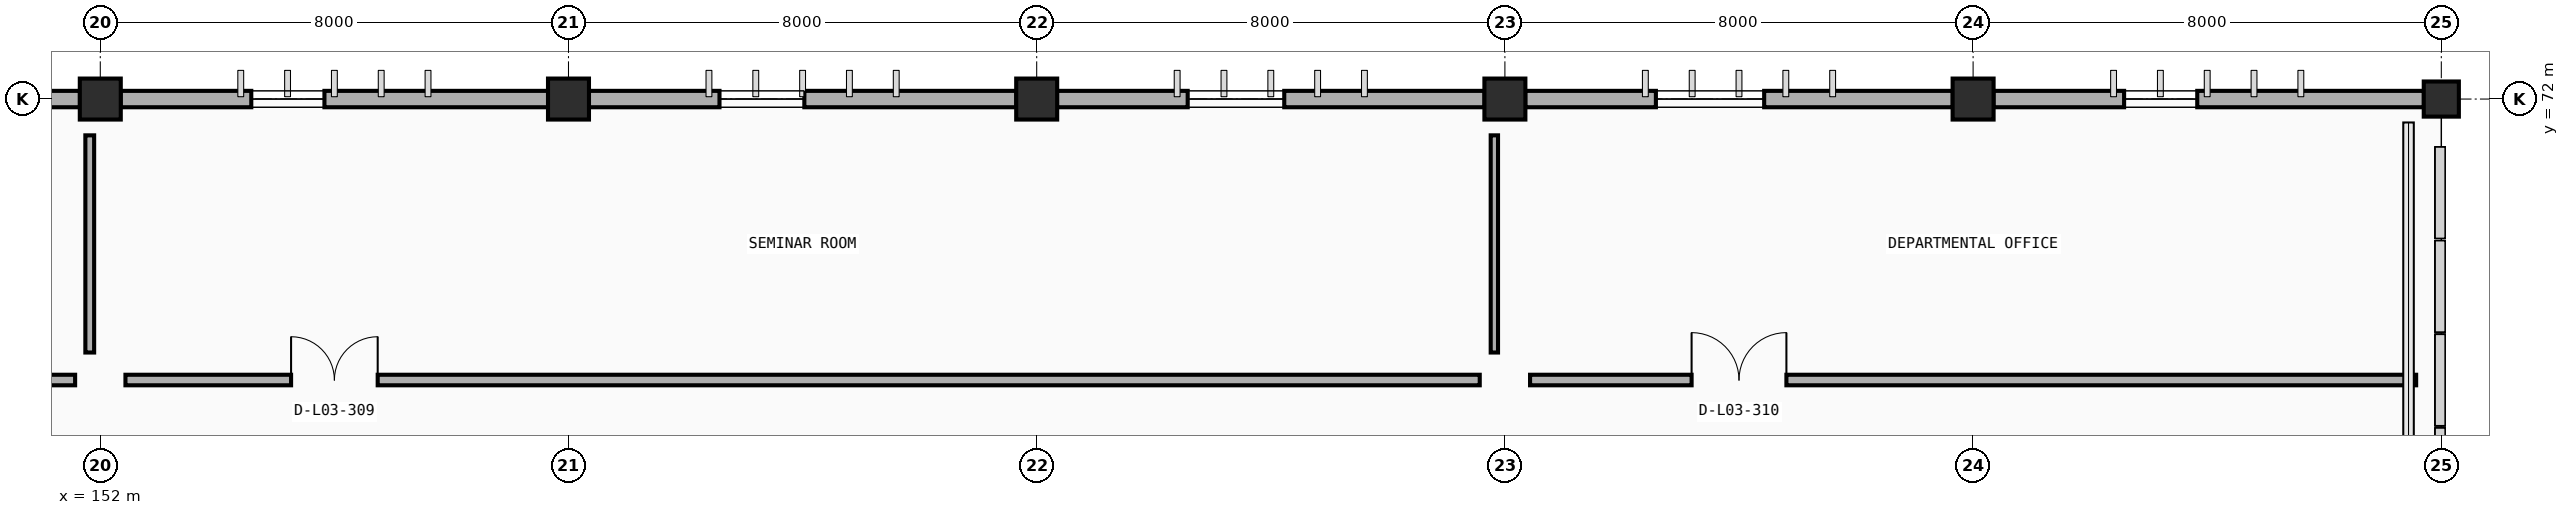
"""IFC4 building model, lengths in metres.
Left out: names, types, materials, properties, quantities, classifications, styles, units other than length and angle.
Written with IfcOpenShell. Run it as: python <this file> out.ifc"""

import sys

from ifc_helpers import new_model, si_unit, direction, frame, frame_2d, origin, origin_2d, place, context, subcontext, project, spatial, rectangle, extrude, element, fill, save


model = new_model("IFC4")
c1 = context("Model", 3, precision=1e-05, world=origin(), true_north=direction((0.0, 1.0)))
c2 = subcontext(c1, "Body", "Model", "MODEL_VIEW")
j1 = project(units=[si_unit("LENGTHUNIT", "METRE"), si_unit("PLANEANGLEUNIT", "RADIAN")], contexts=[c1])
p1 = place(None, origin())
s1 = spatial("IfcSite", under=j1, at=p1, CompositionType="ELEMENT")
p2 = place(p1, origin())
s2 = spatial("IfcBuilding", under=s1, at=p2, CompositionType="ELEMENT")
p3 = place(p2, frame((0.0, 0.0, 9.6)))
s3 = spatial("IfcBuildingStorey", under=s2, at=p3, CompositionType="ELEMENT", Elevation=9.6)
for number, where, z_axis, x_axis in (
    (1, (152.0, 72.0, 0.0), (0.0, 0.0, 1.0), (1.0, 0.0, 0.0)),
    (2, (160.0, 72.0, 0.0), (0.0, 0.0, 1.0), (1.0, 0.0, 0.0)),
    (3, (168.0, 72.0, 0.0), (0.0, 0.0, 1.0), (1.0, 0.0, 0.0)),
    (4, (176.0, 72.0, 0.0), (0.0, 0.0, 1.0), (1.0, 0.0, 0.0)),
    (5, (184.0, 72.0, 0.0), (0.0, 0.0, 1.0), (1.0, 0.0, 0.0)),
):
    element("IfcColumn", number, at=place(p3, frame(where, z_axis=z_axis, x_axis=x_axis)), inside=s3, PredefinedType="COLUMN", context=c2, shape_type="SweptSolid", body=[
        extrude(rectangle(XDim=0.7, YDim=0.7, at=origin_2d()), origin(), (0.0, 0.0, 1.0), 4.2),
    ])
p4 = place(p3, frame((192.0, 72.0, 0.0), z_axis=(0.0, 0.0, 1.0), x_axis=(1.0, 0.0, 0.0)))
e6 = element("IfcColumn", 6, at=p4, inside=s3, PredefinedType="COLUMN", context=c2, shape_type="SweptSolid", body=[
    extrude(rectangle(XDim=0.6, YDim=0.6, at=origin_2d()), origin(), (0.0, 0.0, 1.0), 4.2),
])
p5 = place(p3, frame((144.347, 72.0, 0.0), z_axis=(0.0, 0.0, 1.0), x_axis=(1.0, 0.0, 0.0)))
e7 = element("IfcWall", 7, at=p5, inside=s3, PredefinedType="STANDARD", context=c2, shape_type="SweptSolid", body=[
    extrude(rectangle(XDim=7.306, YDim=0.28, at=frame_2d((3.653, 0.0))), origin(), (0.0, 0.0, 1.0), 3.325),
])
p6 = place(p5, frame((2.233, 0.0, 0.9)))
e8 = element("IfcOpeningElement", 8, at=p6, cuts=e7, PredefinedType="OPENING", context=c2, shape_type="SweptSolid", body=[
    extrude(rectangle(XDim=1.85, YDim=2.0, at=frame_2d((0.925, 1.0))), frame((0.0, 0.15, 0.0), z_axis=(0.0, -1.0, 0.0), x_axis=(1.0, 0.0, 0.0)), (0.0, 0.0, 1.0), 0.3),
])
p7 = place(p3, frame((152.347, 72.0, 0.0), z_axis=(0.0, 0.0, 1.0), x_axis=(1.0, 0.0, 0.0)))
e9 = element("IfcWall", 9, at=p7, inside=s3, PredefinedType="STANDARD", context=c2, shape_type="SweptSolid", body=[
    extrude(rectangle(XDim=7.306, YDim=0.28, at=frame_2d((3.653, 0.0))), origin(), (0.0, 0.0, 1.0), 3.325),
])
p8 = place(p7, frame((2.233, 0.0, 0.9)))
e10 = element("IfcOpeningElement", 10, at=p8, cuts=e9, PredefinedType="OPENING", context=c2, shape_type="SweptSolid", body=[
    extrude(rectangle(XDim=1.25, YDim=2.0, at=frame_2d((0.625, 1.0))), frame((0.0, 0.15, 0.0), z_axis=(0.0, -1.0, 0.0), x_axis=(1.0, 0.0, 0.0)), (0.0, 0.0, 1.0), 0.3),
])
p9 = place(p3, frame((160.347, 72.0, 0.0), z_axis=(0.0, 0.0, 1.0), x_axis=(1.0, 0.0, 0.0)))
e11 = element("IfcWall", 11, at=p9, inside=s3, PredefinedType="STANDARD", context=c2, shape_type="SweptSolid", body=[
    extrude(rectangle(XDim=7.306, YDim=0.28, at=frame_2d((3.653, 0.0))), origin(), (0.0, 0.0, 1.0), 3.325),
])
p10 = place(p9, frame((2.233, 0.0, 0.9)))
e12 = element("IfcOpeningElement", 12, at=p10, cuts=e11, PredefinedType="OPENING", context=c2, shape_type="SweptSolid", body=[
    extrude(rectangle(XDim=1.45, YDim=2.0, at=frame_2d((0.725, 1.0))), frame((0.0, 0.15, 0.0), z_axis=(0.0, -1.0, 0.0), x_axis=(1.0, 0.0, 0.0)), (0.0, 0.0, 1.0), 0.3),
])
p11 = place(p3, frame((168.347, 72.0, 0.0), z_axis=(0.0, 0.0, 1.0), x_axis=(1.0, 0.0, 0.0)))
e13 = element("IfcWall", 13, at=p11, inside=s3, PredefinedType="STANDARD", context=c2, shape_type="SweptSolid", body=[
    extrude(rectangle(XDim=7.306, YDim=0.28, at=frame_2d((3.653, 0.0))), origin(), (0.0, 0.0, 1.0), 3.325),
])
p12 = place(p11, frame((2.233, 0.0, 0.9)))
e14 = element("IfcOpeningElement", 14, at=p12, cuts=e13, PredefinedType="OPENING", context=c2, shape_type="SweptSolid", body=[
    extrude(rectangle(XDim=1.65, YDim=2.0, at=frame_2d((0.825, 1.0))), frame((0.0, 0.15, 0.0), z_axis=(0.0, -1.0, 0.0), x_axis=(1.0, 0.0, 0.0)), (0.0, 0.0, 1.0), 0.3),
])
p13 = place(p3, frame((176.347, 72.0, 0.0), z_axis=(0.0, 0.0, 1.0), x_axis=(1.0, 0.0, 0.0)))
e15 = element("IfcWall", 15, at=p13, inside=s3, PredefinedType="STANDARD", context=c2, shape_type="SweptSolid", body=[
    extrude(rectangle(XDim=7.306, YDim=0.28, at=frame_2d((3.653, 0.0))), origin(), (0.0, 0.0, 1.0), 3.325),
])
p14 = place(p13, frame((2.233, 0.0, 0.9)))
e16 = element("IfcOpeningElement", 16, at=p14, cuts=e15, PredefinedType="OPENING", context=c2, shape_type="SweptSolid", body=[
    extrude(rectangle(XDim=1.85, YDim=2.0, at=frame_2d((0.925, 1.0))), frame((0.0, 0.15, 0.0), z_axis=(0.0, -1.0, 0.0), x_axis=(1.0, 0.0, 0.0)), (0.0, 0.0, 1.0), 0.3),
])
p15 = place(p3, frame((184.347, 72.0, 0.0), z_axis=(0.0, 0.0, 1.0), x_axis=(1.0, 0.0, 0.0)))
e17 = element("IfcWall", 17, at=p15, inside=s3, PredefinedType="STANDARD", context=c2, shape_type="SweptSolid", body=[
    extrude(rectangle(XDim=7.356, YDim=0.28, at=frame_2d((3.678, 0.0))), origin(), (0.0, 0.0, 1.0), 3.325),
])
p16 = place(p15, frame((2.233, 0.0, 0.9)))
e18 = element("IfcOpeningElement", 18, at=p16, cuts=e17, PredefinedType="OPENING", context=c2, shape_type="SweptSolid", body=[
    extrude(rectangle(XDim=1.25, YDim=2.0, at=frame_2d((0.625, 1.0))), frame((0.0, 0.15, 0.0), z_axis=(0.0, -1.0, 0.0), x_axis=(1.0, 0.0, 0.0)), (0.0, 0.0, 1.0), 0.3),
])
p17 = place(p3, frame((191.76, 71.78, 0.0), z_axis=(0.0, 0.0, 1.0), x_axis=(-1.0, 0.0, 0.0)))
e19 = element("IfcWall", 19, at=p17, inside=s3, PredefinedType="PARAPET", context=c2, shape_type="SweptSolid", body=[
    extrude(rectangle(XDim=0.32, YDim=0.2, at=frame_2d((0.16, 0.0))), origin(), (0.0, 0.0, 1.0), 3.35),
])
p18 = place(p3, frame((128.43, 67.2, 0.0), z_axis=(0.0, 0.0, 1.0), x_axis=(1.0, 0.0, 0.0)))
e20 = element("IfcWall", 20, at=p18, inside=s3, PredefinedType="PARTITIONING", context=c2, shape_type="SweptSolid", body=[
    extrude(rectangle(XDim=23.14, YDim=0.18, at=frame_2d((11.57, 0.0))), origin(), (0.0, 0.0, 1.0), 3.3),
])
p19 = place(p18, frame((2.995, 0.0, 0.0)))
e21 = element("IfcOpeningElement", 21, at=p19, cuts=e20, PredefinedType="OPENING", context=c2, shape_type="SweptSolid", body=[
    extrude(rectangle(XDim=1.15, YDim=2.15, at=frame_2d((0.575, 1.075))), frame((0.0, 0.1, 0.0), z_axis=(0.0, -1.0, 0.0), x_axis=(1.0, 0.0, 0.0)), (0.0, 0.0, 1.0), 0.2),
])
p20 = place(p3, frame((151.82, 67.67, 0.0), z_axis=(0.0, 0.0, 1.0), x_axis=(0.0, 1.0, 0.0)))
e22 = element("IfcWall", 22, at=p20, inside=s3, PredefinedType="PARTITIONING", context=c2, shape_type="SweptSolid", body=[
    extrude(rectangle(XDim=3.71, YDim=0.15, at=frame_2d((1.855, 0.0))), origin(), (0.0, 0.0, 1.0), 3.225),
])
p21 = place(p3, frame((152.43, 67.2, 0.0), z_axis=(0.0, 0.0, 1.0), x_axis=(1.0, 0.0, 0.0)))
e23 = element("IfcWall", 23, at=p21, inside=s3, PredefinedType="PARTITIONING", context=c2, shape_type="SweptSolid", body=[
    extrude(rectangle(XDim=23.14, YDim=0.18, at=frame_2d((11.57, 0.0))), origin(), (0.0, 0.0, 1.0), 3.3),
])
p22 = place(p21, frame((2.83, 0.0, 0.0)))
e24 = element("IfcOpeningElement", 24, at=p22, cuts=e23, PredefinedType="OPENING", context=c2, shape_type="SweptSolid", body=[
    extrude(rectangle(XDim=1.48, YDim=2.2, at=frame_2d((0.74, 1.1))), frame((0.0, 0.1, 0.0), z_axis=(0.0, -1.0, 0.0), x_axis=(1.0, 0.0, 0.0)), (0.0, 0.0, 1.0), 0.2),
])
p23 = place(p3, frame((175.82, 67.67, 0.0), z_axis=(0.0, 0.0, 1.0), x_axis=(0.0, 1.0, 0.0)))
e25 = element("IfcWall", 25, at=p23, inside=s3, PredefinedType="PARTITIONING", context=c2, shape_type="SweptSolid", body=[
    extrude(rectangle(XDim=3.71, YDim=0.125, at=frame_2d((1.855, 0.0))), origin(), (0.0, 0.0, 1.0), 3.225),
])
p24 = place(p3, frame((176.43, 67.2, 0.0), z_axis=(0.0, 0.0, 1.0), x_axis=(1.0, 0.0, 0.0)))
e26 = element("IfcWall", 26, at=p24, inside=s3, PredefinedType="PARTITIONING", context=c2, shape_type="SweptSolid", body=[
    extrude(rectangle(XDim=15.14, YDim=0.18, at=frame_2d((7.57, 0.0))), origin(), (0.0, 0.0, 1.0), 3.3),
])
p25 = place(p24, frame((2.76, 0.0, 0.0)))
e27 = element("IfcOpeningElement", 27, at=p25, cuts=e26, PredefinedType="OPENING", context=c2, shape_type="SweptSolid", body=[
    extrude(rectangle(XDim=1.62, YDim=2.2, at=frame_2d((0.81, 1.1))), frame((0.0, 0.1, 0.0), z_axis=(0.0, -1.0, 0.0), x_axis=(1.0, 0.0, 0.0)), (0.0, 0.0, 1.0), 0.2),
])
p26 = place(p8, origin())
e28 = element("IfcWindow", 28, at=p26, inside=s3, PartitioningType="SINGLE_PANEL", PredefinedType="WINDOW", context=c2, shape_type="SweptSolid", body=[
    extrude(rectangle(XDim=1.25, YDim=2.0, at=frame_2d((0.625, 1.0))), frame((0.0, 0.03, 0.0), z_axis=(0.0, -1.0, 0.0), x_axis=(1.0, 0.0, 0.0)), (0.0, 0.0, 1.0), 0.06),
])
fill(e10, e28)
p27 = place(p10, origin())
e29 = element("IfcWindow", 29, at=p27, inside=s3, PartitioningType="SINGLE_PANEL", PredefinedType="WINDOW", context=c2, shape_type="SweptSolid", body=[
    extrude(rectangle(XDim=1.45, YDim=2.0, at=frame_2d((0.725, 1.0))), frame((0.0, 0.03, 0.0), z_axis=(0.0, -1.0, 0.0), x_axis=(1.0, 0.0, 0.0)), (0.0, 0.0, 1.0), 0.06),
])
fill(e12, e29)
p28 = place(p12, origin())
e30 = element("IfcWindow", 30, at=p28, inside=s3, PartitioningType="DOUBLE_PANEL_VERTICAL", PredefinedType="WINDOW", context=c2, shape_type="SweptSolid", body=[
    extrude(rectangle(XDim=1.65, YDim=2.0, at=frame_2d((0.825, 1.0))), frame((0.0, 0.03, 0.0), z_axis=(0.0, -1.0, 0.0), x_axis=(1.0, 0.0, 0.0)), (0.0, 0.0, 1.0), 0.06),
])
fill(e14, e30)
p29 = place(p14, origin())
e31 = element("IfcWindow", 31, at=p29, inside=s3, PartitioningType="DOUBLE_PANEL_VERTICAL", PredefinedType="WINDOW", context=c2, shape_type="SweptSolid", body=[
    extrude(rectangle(XDim=1.85, YDim=2.0, at=frame_2d((0.925, 1.0))), frame((0.0, 0.03, 0.0), z_axis=(0.0, -1.0, 0.0), x_axis=(1.0, 0.0, 0.0)), (0.0, 0.0, 1.0), 0.06),
])
fill(e16, e31)
p30 = place(p16, origin())
e32 = element("IfcWindow", 32, at=p30, inside=s3, PartitioningType="SINGLE_PANEL", PredefinedType="WINDOW", context=c2, shape_type="SweptSolid", body=[
    extrude(rectangle(XDim=1.25, YDim=2.0, at=frame_2d((0.625, 1.0))), frame((0.0, 0.03, 0.0), z_axis=(0.0, -1.0, 0.0), x_axis=(1.0, 0.0, 0.0)), (0.0, 0.0, 1.0), 0.06),
])
fill(e18, e32)
p31 = place(p22, origin())
e33 = element("IfcDoor", 33, at=p31, inside=s3, OperationType="DOUBLE_DOOR_SINGLE_SWING", PredefinedType="DOOR", context=c2, shape_type="SweptSolid", body=[
    extrude(rectangle(XDim=1.48, YDim=2.2, at=frame_2d((0.74, 1.1))), frame((0.0, 0.025, 0.0), z_axis=(0.0, -1.0, 0.0), x_axis=(1.0, 0.0, 0.0)), (0.0, 0.0, 1.0), 0.05),
])
fill(e24, e33)
p32 = place(p25, origin())
e34 = element("IfcDoor", 34, at=p32, inside=s3, OperationType="DOUBLE_DOOR_SINGLE_SWING", PredefinedType="DOOR", context=c2, shape_type="SweptSolid", body=[
    extrude(rectangle(XDim=1.62, YDim=2.2, at=frame_2d((0.81, 1.1))), frame((0.0, 0.025, 0.0), z_axis=(0.0, -1.0, 0.0), x_axis=(1.0, 0.0, 0.0)), (0.0, 0.0, 1.0), 0.05),
])
fill(e27, e34)
save(model, sys.argv[1])
